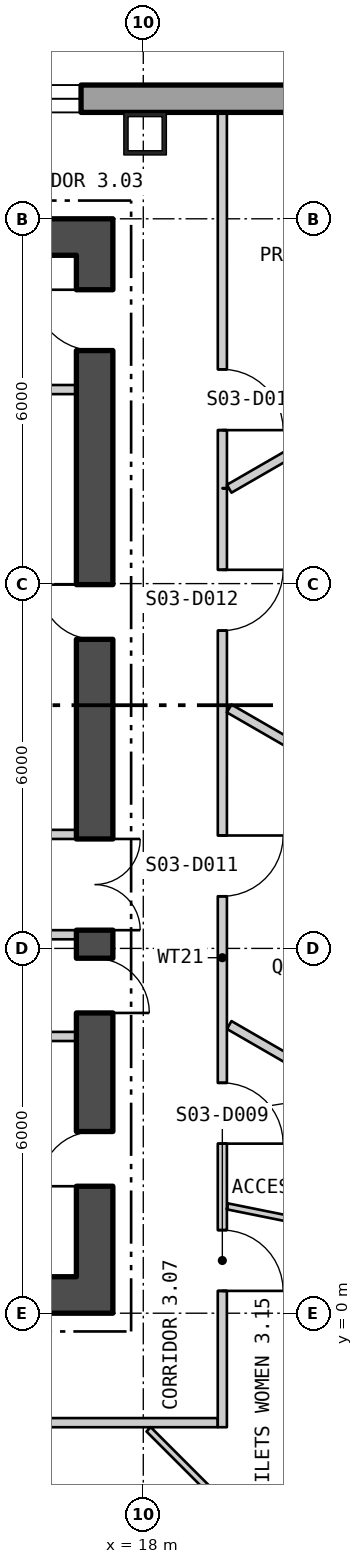
"""IFC4 building model, lengths in metres.
Left out: names, types, materials, properties, quantities, classifications, styles, units other than length and angle.
Written with IfcOpenShell. Run it as: python <this file> out.ifc"""

import sys

from ifc_helpers import new_model, si_unit, direction, frame, frame_2d, origin, origin_2d, place, context, subcontext, project, spatial, polyline, rectangle, hollow_rectangle, outline, extrude, element, fill, save


model = new_model("IFC4")
c1 = context("Model", 3, precision=1e-05, world=origin(), true_north=direction((0.0, 1.0)))
c2 = subcontext(c1, "Body", "Model", "MODEL_VIEW")
j1 = project(units=[si_unit("LENGTHUNIT", "METRE"), si_unit("PLANEANGLEUNIT", "RADIAN")], contexts=[c1])
p1 = place(None, origin())
s1 = spatial("IfcSite", under=j1, at=p1, CompositionType="ELEMENT")
p2 = place(p1, origin())
s2 = spatial("IfcBuilding", under=s1, at=p2, CompositionType="ELEMENT")
p3 = place(p2, frame((0.0, 0.0, 46.8)))
s3 = spatial("IfcBuildingStorey", under=s2, at=p3, CompositionType="ELEMENT", Elevation=46.8)
p4 = place(p3, frame((18.03, 19.4, 0.0), z_axis=(0.0, 0.0, 1.0), x_axis=(-1.0, 0.0, 0.0)))
e1 = element("IfcColumn", 1, at=p4, inside=s3, PredefinedType="COLUMN", context=c2, shape_type="SweptSolid", body=[
    extrude(hollow_rectangle(XDim=0.7, YDim=0.7, WallThickness=0.07, at=origin_2d()), origin(), (0.0, 0.0, 1.0), 4.5),
])
p5 = place(p3, frame((22.87, 19.975, -0.4), z_axis=(0.0, 0.0, 1.0), x_axis=(-1.0, 0.0, 0.0)))
e2 = element("IfcWall", 2, at=p5, inside=s3, PredefinedType="SOLIDWALL", context=c2, shape_type="SweptSolid", body=[
    extrude(outline(polyline([(-0.13, -0.225), (45.87, -0.225), (45.61, 0.225), (0.13, 0.225), (-0.13, -0.225)])), origin(), (0.0, 0.0, 1.0), 4.5),
])
p6 = place(p5, frame((5.893, 0.0, 1.3)))
e3 = element("IfcOpeningElement", 3, at=p6, cuts=e2, PredefinedType="OPENING", context=c2, shape_type="SweptSolid", body=[
    extrude(rectangle(XDim=2.4, YDim=2.6, at=frame_2d((1.2, 1.3))), frame((0.0, 0.235, 0.0), z_axis=(0.0, -1.0, 0.0), x_axis=(1.0, 0.0, 0.0)), (0.0, 0.0, 1.0), 0.47),
])
p7 = place(p5, frame((10.401, 0.0, 1.3)))
e4 = element("IfcOpeningElement", 4, at=p7, cuts=e2, PredefinedType="OPENING", context=c2, shape_type="SweptSolid", body=[
    extrude(rectangle(XDim=2.4, YDim=2.6, at=frame_2d((1.2, 1.3))), frame((0.0, 0.235, 0.0), z_axis=(0.0, -1.0, 0.0), x_axis=(1.0, 0.0, 0.0)), (0.0, 0.0, 1.0), 0.47),
])
p8 = place(p5, frame((14.909, 0.0, 1.3)))
e5 = element("IfcOpeningElement", 5, at=p8, cuts=e2, PredefinedType="OPENING", context=c2, shape_type="SweptSolid", body=[
    extrude(rectangle(XDim=2.4, YDim=2.6, at=frame_2d((1.2, 1.3))), frame((0.0, 0.235, 0.0), z_axis=(0.0, -1.0, 0.0), x_axis=(1.0, 0.0, 0.0)), (0.0, 0.0, 1.0), 0.47),
])
p9 = place(p5, frame((19.416, 0.0, 1.3)))
e6 = element("IfcOpeningElement", 6, at=p9, cuts=e2, PredefinedType="OPENING", context=c2, shape_type="SweptSolid", body=[
    extrude(rectangle(XDim=2.4, YDim=2.6, at=frame_2d((1.2, 1.3))), frame((0.0, 0.235, 0.0), z_axis=(0.0, -1.0, 0.0), x_axis=(1.0, 0.0, 0.0)), (0.0, 0.0, 1.0), 0.47),
])
p10 = place(p5, frame((23.924, 0.0, 1.3)))
e7 = element("IfcOpeningElement", 7, at=p10, cuts=e2, PredefinedType="OPENING", context=c2, shape_type="SweptSolid", body=[
    extrude(rectangle(XDim=2.4, YDim=2.6, at=frame_2d((1.2, 1.3))), frame((0.0, 0.235, 0.0), z_axis=(0.0, -1.0, 0.0), x_axis=(1.0, 0.0, 0.0)), (0.0, 0.0, 1.0), 0.47),
])
p11 = place(p5, frame((28.431, 0.0, 1.3)))
e8 = element("IfcOpeningElement", 8, at=p11, cuts=e2, PredefinedType="OPENING", context=c2, shape_type="SweptSolid", body=[
    extrude(rectangle(XDim=2.4, YDim=2.6, at=frame_2d((1.2, 1.3))), frame((0.0, 0.235, 0.0), z_axis=(0.0, -1.0, 0.0), x_axis=(1.0, 0.0, 0.0)), (0.0, 0.0, 1.0), 0.47),
])
p12 = place(p5, frame((32.939, 0.0, 1.3)))
e9 = element("IfcOpeningElement", 9, at=p12, cuts=e2, PredefinedType="OPENING", context=c2, shape_type="SweptSolid", body=[
    extrude(rectangle(XDim=2.4, YDim=2.6, at=frame_2d((1.2, 1.3))), frame((0.0, 0.235, 0.0), z_axis=(0.0, -1.0, 0.0), x_axis=(1.0, 0.0, 0.0)), (0.0, 0.0, 1.0), 0.47),
])
p13 = place(p5, frame((37.447, 0.0, 1.3)))
e10 = element("IfcOpeningElement", 10, at=p13, cuts=e2, PredefinedType="OPENING", context=c2, shape_type="SweptSolid", body=[
    extrude(rectangle(XDim=2.4, YDim=2.6, at=frame_2d((1.2, 1.3))), frame((0.0, 0.235, 0.0), z_axis=(0.0, -1.0, 0.0), x_axis=(1.0, 0.0, 0.0)), (0.0, 0.0, 1.0), 0.47),
])
p14 = place(p3, frame((5.575, -29.294, -0.18), z_axis=(0.0, 0.0, 1.0), x_axis=(0.499999764979, 0.866025539474, 0.0)))
e11 = element("IfcWall", 11, at=p14, inside=s3, PredefinedType="SOLIDWALL", context=c2, shape_type="SweptSolid", body=[
    extrude(outline(polyline([(-0.13, -0.225), (45.87, -0.225), (45.61, 0.225), (0.13, 0.225), (-0.13, -0.225)])), origin(), (0.0, 0.0, 1.0), 4.28),
])
p15 = place(p14, frame((1.424, 0.0, 1.08)))
e12 = element("IfcOpeningElement", 12, at=p15, cuts=e11, PredefinedType="OPENING", context=c2, shape_type="SweptSolid", body=[
    extrude(rectangle(XDim=2.4, YDim=2.6, at=frame_2d((1.2, 1.3))), frame((0.0, 0.235, 0.0), z_axis=(0.0, -1.0, 0.0), x_axis=(1.0, 0.0, 0.0)), (0.0, 0.0, 1.0), 0.47),
])
p16 = place(p14, frame((5.893, 0.0, 1.08)))
e13 = element("IfcOpeningElement", 13, at=p16, cuts=e11, PredefinedType="OPENING", context=c2, shape_type="SweptSolid", body=[
    extrude(rectangle(XDim=2.4, YDim=2.6, at=frame_2d((1.2, 1.3))), frame((0.0, 0.235, 0.0), z_axis=(0.0, -1.0, 0.0), x_axis=(1.0, 0.0, 0.0)), (0.0, 0.0, 1.0), 0.47),
])
p17 = place(p14, frame((10.401, 0.0, 1.08)))
e14 = element("IfcOpeningElement", 14, at=p17, cuts=e11, PredefinedType="OPENING", context=c2, shape_type="SweptSolid", body=[
    extrude(rectangle(XDim=2.4, YDim=2.6, at=frame_2d((1.2, 1.3))), frame((0.0, 0.235, 0.0), z_axis=(0.0, -1.0, 0.0), x_axis=(1.0, 0.0, 0.0)), (0.0, 0.0, 1.0), 0.47),
])
p18 = place(p14, frame((14.909, 0.0, 1.08)))
e15 = element("IfcOpeningElement", 15, at=p18, cuts=e11, PredefinedType="OPENING", context=c2, shape_type="SweptSolid", body=[
    extrude(rectangle(XDim=2.4, YDim=2.6, at=frame_2d((1.2, 1.3))), frame((0.0, 0.235, 0.0), z_axis=(0.0, -1.0, 0.0), x_axis=(1.0, 0.0, 0.0)), (0.0, 0.0, 1.0), 0.47),
])
p19 = place(p14, frame((19.416, 0.0, 1.08)))
e16 = element("IfcOpeningElement", 16, at=p19, cuts=e11, PredefinedType="OPENING", context=c2, shape_type="SweptSolid", body=[
    extrude(rectangle(XDim=2.4, YDim=2.6, at=frame_2d((1.2, 1.3))), frame((0.0, 0.235, 0.0), z_axis=(0.0, -1.0, 0.0), x_axis=(1.0, 0.0, 0.0)), (0.0, 0.0, 1.0), 0.47),
])
p20 = place(p14, frame((23.924, 0.0, 1.08)))
e17 = element("IfcOpeningElement", 17, at=p20, cuts=e11, PredefinedType="OPENING", context=c2, shape_type="SweptSolid", body=[
    extrude(rectangle(XDim=2.4, YDim=2.6, at=frame_2d((1.2, 1.3))), frame((0.0, 0.235, 0.0), z_axis=(0.0, -1.0, 0.0), x_axis=(1.0, 0.0, 0.0)), (0.0, 0.0, 1.0), 0.47),
])
p21 = place(p14, frame((37.447, 0.0, 1.08)))
e18 = element("IfcOpeningElement", 18, at=p21, cuts=e11, PredefinedType="OPENING", context=c2, shape_type="SweptSolid", body=[
    extrude(rectangle(XDim=2.4, YDim=2.6, at=frame_2d((1.2, 1.3))), frame((0.0, 0.235, 0.0), z_axis=(0.0, -1.0, 0.0), x_axis=(1.0, 0.0, 0.0)), (0.0, 0.0, 1.0), 0.47),
])
p22 = place(p14, frame((41.916, 0.0, 1.08)))
e19 = element("IfcOpeningElement", 19, at=p22, cuts=e11, PredefinedType="OPENING", context=c2, shape_type="SweptSolid", body=[
    extrude(rectangle(XDim=2.4, YDim=2.6, at=frame_2d((1.2, 1.3))), frame((0.0, 0.235, 0.0), z_axis=(0.0, -1.0, 0.0), x_axis=(1.0, 0.0, 0.0)), (0.0, 0.0, 1.0), 0.47),
])
p23 = place(p3, frame((-17.5, 0.3, 0.0), z_axis=(0.0, 0.0, 1.0), x_axis=(1.0, 0.0, 0.0)))
e20 = element("IfcWall", 20, at=p23, inside=s3, PredefinedType="SHEAR", context=c2, shape_type="SweptSolid", body=[
    extrude(rectangle(XDim=35.0, YDim=0.6, at=frame_2d((17.5, 0.0))), origin(), (0.0, 0.0, 1.0), 4.3),
])
p24 = place(p23, frame((12.0, 0.0, 0.0)))
e21 = element("IfcOpeningElement", 21, at=p24, cuts=e20, PredefinedType="OPENING", context=c2, shape_type="SweptSolid", body=[
    extrude(rectangle(XDim=1.8, YDim=2.4, at=frame_2d((0.9, 1.2))), frame((0.0, 0.31, 0.0), z_axis=(0.0, -1.0, 0.0), x_axis=(1.0, 0.0, 0.0)), (0.0, 0.0, 1.0), 0.62),
])
p25 = place(p23, frame((22.0, 0.0, 0.0)))
e22 = element("IfcOpeningElement", 22, at=p25, cuts=e20, PredefinedType="OPENING", context=c2, shape_type="SweptSolid", body=[
    extrude(rectangle(XDim=1.8, YDim=2.4, at=frame_2d((0.9, 1.2))), frame((0.0, 0.31, 0.0), z_axis=(0.0, -1.0, 0.0), x_axis=(1.0, 0.0, 0.0)), (0.0, 0.0, 1.0), 0.62),
])
p26 = place(p3, frame((-17.5, 17.7, 0.0), z_axis=(0.0, 0.0, 1.0), x_axis=(1.0, 0.0, 0.0)))
e23 = element("IfcWall", 23, at=p26, inside=s3, PredefinedType="SHEAR", context=c2, shape_type="SweptSolid", body=[
    extrude(rectangle(XDim=35.0, YDim=0.6, at=frame_2d((17.5, 0.0))), origin(), (0.0, 0.0, 1.0), 4.3),
])
p27 = place(p3, frame((17.2, 0.6, 0.0), z_axis=(0.0, 0.0, 1.0), x_axis=(0.0, 1.0, 0.0)))
e24 = element("IfcWall", 24, at=p27, inside=s3, PredefinedType="SHEAR", context=c2, shape_type="SweptSolid", body=[
    extrude(rectangle(XDim=16.8, YDim=0.6, at=frame_2d((8.4, 0.0))), origin(), (0.0, 0.0, 1.0), 4.3),
])
p28 = place(p27, frame((5.7, 0.0, 0.0)))
e25 = element("IfcOpeningElement", 25, at=p28, cuts=e24, PredefinedType="OPENING", context=c2, shape_type="SweptSolid", body=[
    extrude(rectangle(XDim=1.5, YDim=2.1, at=frame_2d((0.75, 1.05))), frame((0.0, 0.31, 0.0), z_axis=(0.0, -1.0, 0.0), x_axis=(1.0, 0.0, 0.0)), (0.0, 0.0, 1.0), 0.62),
])
p29 = place(p27, frame((1.488, 0.0, 0.0)))
e26 = element("IfcOpeningElement", 26, at=p29, cuts=e24, PredefinedType="OPENING", context=c2, shape_type="SweptSolid", body=[
    extrude(rectangle(XDim=0.9, YDim=2.1, at=frame_2d((0.45, 1.05))), frame((0.0, 0.31, 0.0), z_axis=(0.0, -1.0, 0.0), x_axis=(1.0, 0.0, 0.0)), (0.0, 0.0, 1.0), 0.62),
])
p30 = place(p27, frame((4.338, 0.0, 0.0)))
e27 = element("IfcOpeningElement", 27, at=p30, cuts=e24, PredefinedType="OPENING", context=c2, shape_type="SweptSolid", body=[
    extrude(rectangle(XDim=0.9, YDim=2.1, at=frame_2d((0.45, 1.05))), frame((0.0, 0.31, 0.0), z_axis=(0.0, -1.0, 0.0), x_axis=(1.0, 0.0, 0.0)), (0.0, 0.0, 1.0), 0.62),
])
p31 = place(p27, frame((10.483, 0.0, 0.0)))
e28 = element("IfcOpeningElement", 28, at=p31, cuts=e24, PredefinedType="OPENING", context=c2, shape_type="SweptSolid", body=[
    extrude(rectangle(XDim=0.9, YDim=2.1, at=frame_2d((0.45, 1.05))), frame((0.0, 0.31, 0.0), z_axis=(0.0, -1.0, 0.0), x_axis=(1.0, 0.0, 0.0)), (0.0, 0.0, 1.0), 0.62),
])
p32 = place(p27, frame((15.233, 0.0, 0.0)))
e29 = element("IfcOpeningElement", 29, at=p32, cuts=e24, PredefinedType="OPENING", context=c2, shape_type="SweptSolid", body=[
    extrude(rectangle(XDim=1.0, YDim=2.1, at=frame_2d((0.5, 1.05))), frame((0.0, 0.31, 0.0), z_axis=(0.0, -1.0, 0.0), x_axis=(1.0, 0.0, 0.0)), (0.0, 0.0, 1.0), 0.62),
])
for number, where, z_axis, x_axis in (
    (30, (14.5, 6.225, 0.0), (0.0, 0.0, 1.0), (1.0, 0.0, 0.0)),
    (31, (14.5, 7.875, 0.0), (0.0, 0.0, 1.0), (1.0, 0.0, 0.0)),
    (32, (14.5, 4.552, 0.0), (0.0, 0.0, 1.0), (1.0, 0.0, 0.0)),
    (33, (14.5, 15.191, 0.0), (0.0, 0.0, 1.0), (1.0, 0.0, 0.0)),
):
    element("IfcWall", number, at=place(p3, frame(where, z_axis=z_axis, x_axis=x_axis)), inside=s3, PredefinedType="PARTITIONING", context=c2, shape_type="SweptSolid", body=[
        extrude(rectangle(XDim=2.4, YDim=0.15, at=frame_2d((1.2, 0.0))), origin(), (0.0, 0.0, 1.0), 4.3),
    ])
p33 = place(p3, frame((7.925, -1.8, 0.0), z_axis=(0.0, 0.0, 1.0), x_axis=(1.0, 0.0, 0.0)))
e34 = element("IfcWall", 34, at=p33, inside=s3, PredefinedType="PARTITIONING", context=c2, shape_type="SweptSolid", body=[
    extrude(rectangle(XDim=11.3, YDim=0.15, at=frame_2d((5.65, 0.0))), origin(), (0.0, 0.0, 1.0), 4.3),
])
p34 = place(p33, frame((7.087, 0.0, 0.0)))
e35 = element("IfcOpeningElement", 35, at=p34, cuts=e34, PredefinedType="OPENING", context=c2, shape_type="SweptSolid", body=[
    extrude(rectangle(XDim=1.0, YDim=2.1, at=frame_2d((0.5, 1.05))), frame((0.0, 0.085, 0.0), z_axis=(0.0, -1.0, 0.0), x_axis=(1.0, 0.0, 0.0)), (0.0, 0.0, 1.0), 0.17),
])
p35 = place(p3, frame((12.953, -1.94, 0.0), z_axis=(0.0, 0.0, 1.0), x_axis=(0.86605716012, -0.499944992379, 0.0)))
e36 = element("IfcWall", 36, at=p35, inside=s3, PredefinedType="PARTITIONING", context=c2, shape_type="SweptSolid", body=[
    extrude(rectangle(XDim=6.613, YDim=0.15, at=frame_2d((3.306, 0.0))), origin(), (0.0, 0.0, 1.0), 4.3),
])
p36 = place(p3, frame((18.088, -1.91, 0.0), z_axis=(0.0, 0.0, 1.0), x_axis=(0.707106781187, -0.707106781187, 0.0)))
e37 = element("IfcWall", 37, at=p36, inside=s3, PredefinedType="PARTITIONING", context=c2, shape_type="SweptSolid", body=[
    extrude(rectangle(XDim=2.722, YDim=0.1, at=frame_2d((1.361, 0.0))), origin(), (0.0, 0.0, 1.0), 4.3),
])
p37 = place(p3, frame((19.3, -1.875, 0.0), z_axis=(0.0, 0.0, 1.0), x_axis=(6.4750065e-05, 0.999999997904, 0.0)))
e38 = element("IfcWall", 38, at=p37, inside=s3, PredefinedType="PARTITIONING", context=c2, shape_type="SweptSolid", body=[
    extrude(rectangle(XDim=15.444, YDim=0.15, at=frame_2d((7.722, 0.0))), origin(), (0.0, 0.0, 1.0), 4.3),
])
p38 = place(p37, frame((2.242, 0.0, 0.0)))
e39 = element("IfcOpeningElement", 39, at=p38, cuts=e38, PredefinedType="OPENING", context=c2, shape_type="SweptSolid", body=[
    extrude(rectangle(XDim=1.0, YDim=2.1, at=frame_2d((0.5, 1.05))), frame((0.0, 0.085, 0.0), z_axis=(0.0, -1.0, 0.0), x_axis=(1.0, 0.0, 0.0)), (0.0, 0.0, 1.0), 0.17),
])
p39 = place(p37, frame((4.664, 0.0, 0.0)))
e40 = element("IfcOpeningElement", 40, at=p39, cuts=e38, PredefinedType="OPENING", context=c2, shape_type="SweptSolid", body=[
    extrude(rectangle(XDim=1.0, YDim=2.1, at=frame_2d((0.5, 1.05))), frame((0.0, 0.085, 0.0), z_axis=(0.0, -1.0, 0.0), x_axis=(1.0, 0.0, 0.0)), (0.0, 0.0, 1.0), 0.17),
])
p40 = place(p37, frame((8.732, 0.0, 0.0)))
e41 = element("IfcOpeningElement", 41, at=p40, cuts=e38, PredefinedType="OPENING", context=c2, shape_type="SweptSolid", body=[
    extrude(rectangle(XDim=1.0, YDim=2.1, at=frame_2d((0.5, 1.05))), frame((0.0, 0.085, 0.0), z_axis=(0.0, -1.0, 0.0), x_axis=(1.0, 0.0, 0.0)), (0.0, 0.0, 1.0), 0.17),
])
p41 = place(p37, frame((13.102, 0.0, 0.0)))
e42 = element("IfcOpeningElement", 42, at=p41, cuts=e38, PredefinedType="OPENING", context=c2, shape_type="SweptSolid", body=[
    extrude(rectangle(XDim=1.0, YDim=2.1, at=frame_2d((0.5, 1.05))), frame((0.0, 0.085, 0.0), z_axis=(0.0, -1.0, 0.0), x_axis=(1.0, 0.0, 0.0)), (0.0, 0.0, 1.0), 0.17),
])
p42 = place(p3, frame((19.3, 19.749, 0.0), z_axis=(0.0, 0.0, 1.0), x_axis=(0.000161812296, -0.999999986908, 0.0)))
e43 = element("IfcWall", 43, at=p42, inside=s3, PredefinedType="PARTITIONING", context=c2, shape_type="SweptSolid", body=[
    extrude(rectangle(XDim=6.18, YDim=0.15, at=frame_2d((3.09, 0.0))), origin(), (0.0, 0.0, 1.0), 4.3),
])
p43 = place(p42, frame((4.225, 0.0, 0.0)))
e44 = element("IfcOpeningElement", 44, at=p43, cuts=e43, PredefinedType="OPENING", context=c2, shape_type="SweptSolid", body=[
    extrude(rectangle(XDim=1.0, YDim=2.1, at=frame_2d((0.5, 1.05))), frame((0.0, 0.085, 0.0), z_axis=(0.0, -1.0, 0.0), x_axis=(1.0, 0.0, 0.0)), (0.0, 0.0, 1.0), 0.17),
])
p44 = place(p3, frame((19.385, 1.757, 0.0), z_axis=(0.0, 0.0, 1.0), x_axis=(0.980240840704, -0.197807720316, 0.0)))
e45 = element("IfcWall", 45, at=p44, inside=s3, PredefinedType="PARTITIONING", context=c2, shape_type="SweptSolid", body=[
    extrude(rectangle(XDim=3.524, YDim=0.1, at=frame_2d((1.762, 0.0))), origin(), (0.0, 0.0, 1.0), 4.3),
])
p45 = place(p3, frame((19.413, 4.74, 0.0), z_axis=(0.0, 0.0, 1.0), x_axis=(0.866017446268, -0.50001378257, 0.0)))
e46 = element("IfcWall", 46, at=p45, inside=s3, PredefinedType="PARTITIONING", context=c2, shape_type="SweptSolid", body=[
    extrude(rectangle(XDim=4.358, YDim=0.15, at=frame_2d((2.179, 0.0))), origin(), (0.0, 0.0, 1.0), 4.3),
])
p46 = place(p3, frame((19.413, 9.946, 0.0), z_axis=(0.0, 0.0, 1.0), x_axis=(0.866042039906, -0.499971184285, 0.0)))
e47 = element("IfcWall", 47, at=p46, inside=s3, PredefinedType="PARTITIONING", context=c2, shape_type="SweptSolid", body=[
    extrude(rectangle(XDim=6.96, YDim=0.15, at=frame_2d((3.48, 0.0))), origin(), (0.0, 0.0, 1.0), 4.3),
])
p47 = place(p3, frame((19.413, 13.56, 0.0), z_axis=(0.0, 0.0, 1.0), x_axis=(0.866040948072, 0.499973075538, 0.0)))
e48 = element("IfcWall", 48, at=p47, inside=s3, PredefinedType="PARTITIONING", context=c2, shape_type="SweptSolid", body=[
    extrude(rectangle(XDim=5.526, YDim=0.15, at=frame_2d((2.763, 0.0))), origin(), (0.0, 0.0, 1.0), 4.3),
])
p48 = place(p6, origin())
e49 = element("IfcWindow", 49, at=p48, inside=s3, PartitioningType="SINGLE_PANEL", PredefinedType="WINDOW", context=c2, shape_type="SweptSolid", body=[
    extrude(rectangle(XDim=2.4, YDim=2.6, at=frame_2d((1.2, 1.3))), frame((0.0, 0.105, 0.0), z_axis=(0.0, -1.0, 0.0), x_axis=(1.0, 0.0, 0.0)), (0.0, 0.0, 1.0), 0.06),
])
fill(e3, e49)
p49 = place(p28, origin())
e50 = element("IfcDoor", 50, at=p49, inside=s3, OperationType="DOUBLE_DOOR_SINGLE_SWING", PredefinedType="DOOR", context=c2, shape_type="SweptSolid", body=[
    extrude(rectangle(XDim=1.5, YDim=2.1, at=frame_2d((0.75, 1.05))), frame((0.0, 0.025, 0.0), z_axis=(0.0, -1.0, 0.0), x_axis=(1.0, 0.0, 0.0)), (0.0, 0.0, 1.0), 0.05),
])
fill(e25, e50)
p50 = place(p29, origin())
e51 = element("IfcDoor", 51, at=p50, inside=s3, OperationType="SINGLE_SWING_RIGHT", PredefinedType="DOOR", context=c2, shape_type="SweptSolid", body=[
    extrude(rectangle(XDim=0.9, YDim=2.1, at=frame_2d((0.45, 1.05))), frame((0.0, 0.025, 0.0), z_axis=(0.0, -1.0, 0.0), x_axis=(1.0, 0.0, 0.0)), (0.0, 0.0, 1.0), 0.05),
])
fill(e26, e51)
p51 = place(p30, origin())
e52 = element("IfcDoor", 52, at=p51, inside=s3, OperationType="SINGLE_SWING_LEFT", PredefinedType="DOOR", context=c2, shape_type="SweptSolid", body=[
    extrude(rectangle(XDim=0.9, YDim=2.1, at=frame_2d((0.45, 1.05))), frame((0.0, 0.025, 0.0), z_axis=(0.0, -1.0, 0.0), x_axis=(1.0, 0.0, 0.0)), (0.0, 0.0, 1.0), 0.05),
])
fill(e27, e52)
p52 = place(p31, origin())
e53 = element("IfcDoor", 53, at=p52, inside=s3, OperationType="SINGLE_SWING_LEFT", PredefinedType="DOOR", context=c2, shape_type="SweptSolid", body=[
    extrude(rectangle(XDim=0.9, YDim=2.1, at=frame_2d((0.45, 1.05))), frame((0.0, 0.025, 0.0), z_axis=(0.0, -1.0, 0.0), x_axis=(1.0, 0.0, 0.0)), (0.0, 0.0, 1.0), 0.05),
])
fill(e28, e53)
p53 = place(p32, origin())
e54 = element("IfcDoor", 54, at=p53, inside=s3, OperationType="SINGLE_SWING_LEFT", PredefinedType="DOOR", context=c2, shape_type="SweptSolid", body=[
    extrude(rectangle(XDim=1.0, YDim=2.1, at=frame_2d((0.5, 1.05))), frame((0.0, 0.025, 0.0), z_axis=(0.0, -1.0, 0.0), x_axis=(1.0, 0.0, 0.0)), (0.0, 0.0, 1.0), 0.05),
])
fill(e29, e54)
p54 = place(p38, origin())
e55 = element("IfcDoor", 55, at=p54, inside=s3, OperationType="SINGLE_SWING_LEFT", PredefinedType="DOOR", context=c2, shape_type="SweptSolid", body=[
    extrude(rectangle(XDim=1.0, YDim=2.1, at=frame_2d((0.5, 1.05))), frame((0.0, 0.025, 0.0), z_axis=(0.0, -1.0, 0.0), x_axis=(1.0, 0.0, 0.0)), (0.0, 0.0, 1.0), 0.05),
])
fill(e39, e55)
p55 = place(p39, origin())
e56 = element("IfcDoor", 56, at=p55, inside=s3, OperationType="SINGLE_SWING_LEFT", PredefinedType="DOOR", context=c2, shape_type="SweptSolid", body=[
    extrude(rectangle(XDim=1.0, YDim=2.1, at=frame_2d((0.5, 1.05))), frame((0.0, 0.025, 0.0), z_axis=(0.0, -1.0, 0.0), x_axis=(1.0, 0.0, 0.0)), (0.0, 0.0, 1.0), 0.05),
])
fill(e40, e56)
p56 = place(p40, origin())
e57 = element("IfcDoor", 57, at=p56, inside=s3, OperationType="SINGLE_SWING_RIGHT", PredefinedType="DOOR", context=c2, shape_type="SweptSolid", body=[
    extrude(rectangle(XDim=1.0, YDim=2.1, at=frame_2d((0.5, 1.05))), frame((0.0, 0.025, 0.0), z_axis=(0.0, -1.0, 0.0), x_axis=(1.0, 0.0, 0.0)), (0.0, 0.0, 1.0), 0.05),
])
fill(e41, e57)
p57 = place(p41, origin())
e58 = element("IfcDoor", 58, at=p57, inside=s3, OperationType="SINGLE_SWING_RIGHT", PredefinedType="DOOR", context=c2, shape_type="SweptSolid", body=[
    extrude(rectangle(XDim=1.0, YDim=2.1, at=frame_2d((0.5, 1.05))), frame((0.0, 0.025, 0.0), z_axis=(0.0, -1.0, 0.0), x_axis=(1.0, 0.0, 0.0)), (0.0, 0.0, 1.0), 0.05),
])
fill(e42, e58)
p58 = place(p43, origin())
e59 = element("IfcDoor", 59, at=p58, inside=s3, OperationType="SINGLE_SWING_LEFT", PredefinedType="DOOR", context=c2, shape_type="SweptSolid", body=[
    extrude(rectangle(XDim=1.0, YDim=2.1, at=frame_2d((0.5, 1.05))), frame((0.0, 0.025, 0.0), z_axis=(0.0, -1.0, 0.0), x_axis=(1.0, 0.0, 0.0)), (0.0, 0.0, 1.0), 0.05),
])
fill(e44, e59)
save(model, sys.argv[1])
